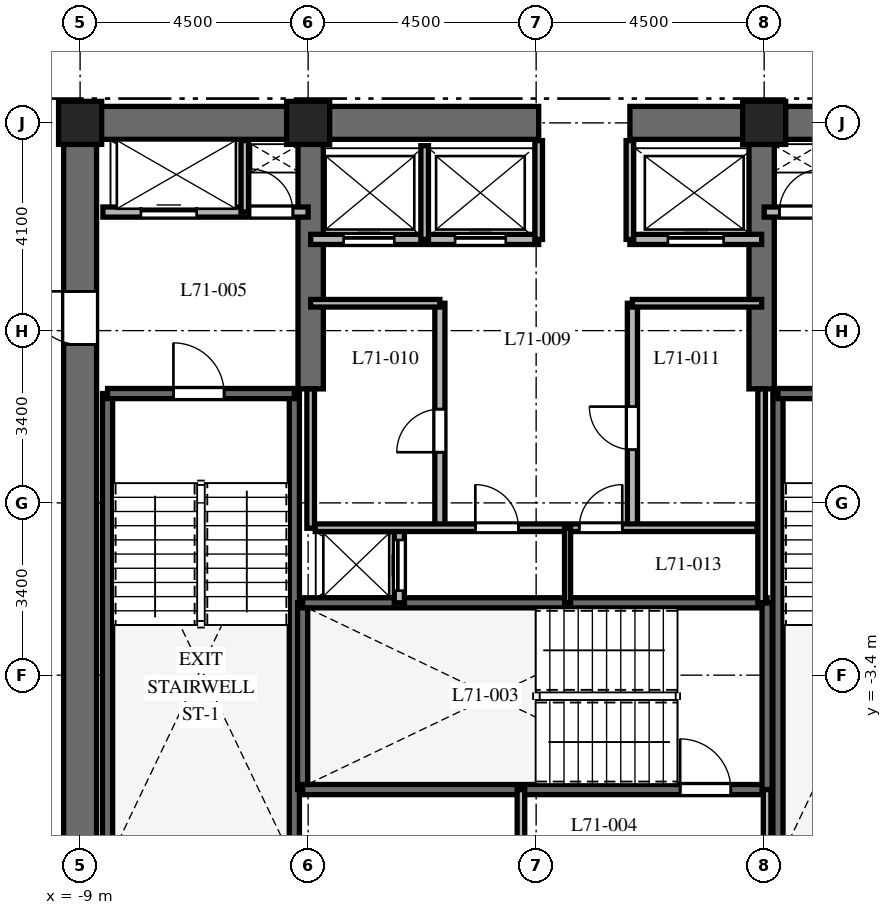
"""IFC4 building model, lengths in metres.
Left out: names, types, materials, properties, quantities, classifications, styles, units other than length and angle.
Written with IfcOpenShell. Run it as: python <this file> out.ifc"""

import sys

from ifc_helpers import new_model, si_unit, direction, frame, frame_2d, origin, origin_2d, place, context, subcontext, project, spatial, rectangle, extrude, element, fill, save


model = new_model("IFC4")
c1 = context("Model", 3, precision=1e-05, world=origin(), true_north=direction((0.0, 1.0)))
c2 = subcontext(c1, "Body", "Model", "MODEL_VIEW")
j1 = project(units=[si_unit("LENGTHUNIT", "METRE"), si_unit("PLANEANGLEUNIT", "RADIAN")], contexts=[c1])
p1 = place(None, origin())
s1 = spatial("IfcSite", under=j1, at=p1, CompositionType="ELEMENT")
p2 = place(p1, origin())
s2 = spatial("IfcBuilding", under=s1, at=p2, CompositionType="ELEMENT")
p3 = place(p2, frame((0.0, 0.0, 284.7)))
s3 = spatial("IfcBuildingStorey", under=s2, at=p3, CompositionType="ELEMENT", Elevation=284.7)
p4 = place(p3, frame((-9.325, 7.5, 0.0), z_axis=(0.0, 0.0, 1.0), x_axis=(1.0, 0.0, 0.0)))
e1 = element("IfcWall", 1, at=p4, inside=s3, PredefinedType="SHEAR", context=c2, shape_type="SweptSolid", body=[
    extrude(rectangle(XDim=9.375, YDim=0.65, at=frame_2d((4.688, 0.0))), origin(), (0.0, 0.0, 1.0), 3.9),
])
p5 = place(p3, frame((1.85, 7.5, 0.0), z_axis=(0.0, 0.0, 1.0), x_axis=(1.0, 0.0, 0.0)))
e2 = element("IfcWall", 2, at=p5, inside=s3, PredefinedType="SHEAR", context=c2, shape_type="SweptSolid", body=[
    extrude(rectangle(XDim=7.475, YDim=0.65, at=frame_2d((3.737, 0.0))), origin(), (0.0, 0.0, 1.0), 3.9),
])
p6 = place(p3, frame((-9.0, -7.175, 0.0), z_axis=(0.0, 0.0, 1.0), x_axis=(0.0, 1.0, 0.0)))
e3 = element("IfcWall", 3, at=p6, inside=s3, PredefinedType="SHEAR", context=c2, shape_type="SweptSolid", body=[
    extrude(rectangle(XDim=14.35, YDim=0.65, at=frame_2d((7.175, 0.0))), origin(), (0.0, 0.0, 1.0), 3.9),
])
p7 = place(p6, frame((10.3, 0.0, 0.0)))
e4 = element("IfcOpeningElement", 4, at=p7, cuts=e3, PredefinedType="OPENING", context=c2, shape_type="SweptSolid", body=[
    extrude(rectangle(XDim=1.05, YDim=2.15, at=frame_2d((0.525, 1.075))), frame((0.0, 0.335, 0.0), z_axis=(0.0, -1.0, 0.0), x_axis=(1.0, 0.0, 0.0)), (0.0, 0.0, 1.0), 0.67),
])
for number, where, z_axis, x_axis in (
    (5, (-4.45, 2.25, 0.0), (0.0, 0.0, 1.0), (0.0, 1.0, 0.0)),
    (6, (4.45, 2.25, 0.0), (0.0, 0.0, 1.0), (0.0, 1.0, 0.0)),
):
    element("IfcWall", number, at=place(p3, frame(where, z_axis=z_axis, x_axis=x_axis)), inside=s3, PredefinedType="SHEAR", context=c2, shape_type="SweptSolid", body=[
        extrude(rectangle(XDim=4.925, YDim=0.5, at=frame_2d((2.462, 0.0))), origin(), (0.0, 0.0, 1.0), 3.9),
    ])
for number, where, z_axis, x_axis in (
    (7, (-8.458, -6.985, 0.0), (0.0, 0.0, 1.0), (0.0, 1.0, 0.0)),
    (8, (-4.772, -6.985, 0.0), (0.0, 0.0, 1.0), (0.0, 1.0, 0.0)),
):
    element("IfcWall", number, at=place(p3, frame(where, z_axis=z_axis, x_axis=x_axis)), inside=s3, PredefinedType="SHEAR", context=c2, shape_type="SweptSolid", body=[
        extrude(rectangle(XDim=9.143, YDim=0.2, at=frame_2d((4.572, 0.0))), origin(), (0.0, 0.0, 1.0), 3.9),
    ])
p8 = place(p3, frame((-8.458, 2.158, 0.0), z_axis=(0.0, 0.0, 1.0), x_axis=(1.0, 0.0, 0.0)))
e9 = element("IfcWall", 9, at=p8, inside=s3, PredefinedType="SHEAR", context=c2, shape_type="SweptSolid", body=[
    extrude(rectangle(XDim=3.686, YDim=0.2, at=frame_2d((1.843, 0.0))), origin(), (0.0, 0.0, 1.0), 3.9),
])
p9 = place(p8, frame((1.3, 0.0, 0.0)))
e10 = element("IfcOpeningElement", 10, at=p9, cuts=e9, PredefinedType="OPENING", context=c2, shape_type="SweptSolid", body=[
    extrude(rectangle(XDim=1.0, YDim=2.15, at=frame_2d((0.5, 1.075))), frame((0.0, 0.11, 0.0), z_axis=(0.0, -1.0, 0.0), x_axis=(1.0, 0.0, 0.0)), (0.0, 0.0, 1.0), 0.22),
])
p10 = place(p3, frame((4.772, -6.985, 0.0), z_axis=(0.0, 0.0, 1.0), x_axis=(0.0, 1.0, 0.0)))
e11 = element("IfcWall", 11, at=p10, inside=s3, PredefinedType="SHEAR", context=c2, shape_type="SweptSolid", body=[
    extrude(rectangle(XDim=9.143, YDim=0.2, at=frame_2d((4.572, 0.0))), origin(), (0.0, 0.0, 1.0), 3.9),
])
p11 = place(p3, frame((4.772, 2.158, 0.0), z_axis=(0.0, 0.0, 1.0), x_axis=(1.0, 0.0, 0.0)))
e12 = element("IfcWall", 12, at=p11, inside=s3, PredefinedType="SHEAR", context=c2, shape_type="SweptSolid", body=[
    extrude(rectangle(XDim=3.686, YDim=0.2, at=frame_2d((1.843, 0.0))), origin(), (0.0, 0.0, 1.0), 3.9),
])
p12 = place(p11, frame((1.35, 0.0, 0.0)))
e13 = element("IfcOpeningElement", 13, at=p12, cuts=e12, PredefinedType="OPENING", context=c2, shape_type="SweptSolid", body=[
    extrude(rectangle(XDim=1.0, YDim=2.15, at=frame_2d((0.5, 1.075))), frame((0.0, 0.11, 0.0), z_axis=(0.0, -1.0, 0.0), x_axis=(1.0, 0.0, 0.0)), (0.0, 0.0, 1.0), 0.22),
])
p13 = place(p3, frame((-4.608, -5.658, 0.0), z_axis=(0.0, 0.0, 1.0), x_axis=(0.0, 1.0, 0.0)))
e14 = element("IfcWall", 14, at=p13, inside=s3, PredefinedType="SHEAR", context=c2, shape_type="SweptSolid", body=[
    extrude(rectangle(XDim=3.686, YDim=0.2, at=frame_2d((1.843, 0.0))), origin(), (0.0, 0.0, 1.0), 3.9),
])
p14 = place(p3, frame((-4.608, -5.658, 0.0), z_axis=(0.0, 0.0, 1.0), x_axis=(1.0, 0.0, 0.0)))
e15 = element("IfcWall", 15, at=p14, inside=s3, PredefinedType="SHEAR", context=c2, shape_type="SweptSolid", body=[
    extrude(rectangle(XDim=9.166, YDim=0.2, at=frame_2d((4.583, 0.0))), origin(), (0.0, 0.0, 1.0), 3.9),
])
p15 = place(p14, frame((7.45, 0.0, 0.0)))
e16 = element("IfcOpeningElement", 16, at=p15, cuts=e15, PredefinedType="OPENING", context=c2, shape_type="SweptSolid", body=[
    extrude(rectangle(XDim=1.0, YDim=2.15, at=frame_2d((0.5, 1.075))), frame((0.0, 0.11, 0.0), z_axis=(0.0, -1.0, 0.0), x_axis=(1.0, 0.0, 0.0)), (0.0, 0.0, 1.0), 0.22),
])
p16 = place(p3, frame((-4.608, -1.972, 0.0), z_axis=(0.0, 0.0, 1.0), x_axis=(1.0, 0.0, 0.0)))
e17 = element("IfcWall", 17, at=p16, inside=s3, PredefinedType="SHEAR", context=c2, shape_type="SweptSolid", body=[
    extrude(rectangle(XDim=9.166, YDim=0.2, at=frame_2d((4.583, 0.0))), origin(), (0.0, 0.0, 1.0), 3.9),
])
p17 = place(p3, frame((4.558, -5.658, 0.0), z_axis=(0.0, 0.0, 1.0), x_axis=(0.0, 1.0, 0.0)))
e18 = element("IfcWall", 18, at=p17, inside=s3, PredefinedType="SHEAR", context=c2, shape_type="SweptSolid", body=[
    extrude(rectangle(XDim=3.686, YDim=0.2, at=frame_2d((1.843, 0.0))), origin(), (0.0, 0.0, 1.0), 3.9),
])
for number, where, z_axis, x_axis in (
    (19, (4.5, 7.5, 0.0), (0.0, 0.0, 1.0), (1.0, 0.0, 0.0)),
    (20, (-4.5, 7.5, 0.0), (0.0, 0.0, 1.0), (1.0, 0.0, 0.0)),
    (21, (-9.0, 7.5, 0.0), (0.0, 0.0, 1.0), (1.0, 0.0, 0.0)),
):
    element("IfcColumn", number, at=place(p3, frame(where, z_axis=z_axis, x_axis=x_axis)), inside=s3, PredefinedType="COLUMN", context=c2, shape_type="SweptSolid", body=[
        extrude(rectangle(XDim=0.85, YDim=0.85, at=origin_2d()), origin(), (0.0, 0.0, 1.0), 3.9),
    ])
for number, where, z_axis, x_axis in (
    (22, (-0.3, -7.02, 0.0), (0.0, 0.0, 1.0), (0.0, 1.0, 0.0)),
    (23, (4.558, -7.02, 0.0), (0.0, 0.0, 1.0), (0.0, 1.0, 0.0)),
):
    element("IfcWall", number, at=place(p3, frame(where, z_axis=z_axis, x_axis=x_axis)), inside=s3, PredefinedType="PARTITIONING", context=c2, shape_type="SweptSolid", body=[
        extrude(rectangle(XDim=1.362, YDim=0.15, at=frame_2d((0.681, 0.0))), origin(), (0.0, 0.0, 1.0), 3.58),
    ])
p18 = place(p3, frame((-8.55, 5.74, 0.0), z_axis=(0.0, 0.0, 1.0), x_axis=(1.0, 0.0, 0.0)))
e24 = element("IfcWall", 24, at=p18, inside=s3, PredefinedType="PARTITIONING", context=c2, shape_type="SweptSolid", body=[
    extrude(rectangle(XDim=4.05, YDim=0.2, at=frame_2d((2.025, 0.0))), origin(), (0.0, 0.0, 1.0), 3.58),
])
p19 = place(p18, frame((0.75, 0.0, 0.0)))
e25 = element("IfcOpeningElement", 25, at=p19, cuts=e24, PredefinedType="OPENING", context=c2, shape_type="SweptSolid", body=[
    extrude(rectangle(XDim=1.1, YDim=2.2, at=frame_2d((0.55, 1.1))), frame((0.0, 0.11, 0.0), z_axis=(0.0, -1.0, 0.0), x_axis=(1.0, 0.0, 0.0)), (0.0, 0.0, 1.0), 0.22),
])
p20 = place(p18, frame((2.9, 0.0, 0.0)))
e26 = element("IfcOpeningElement", 26, at=p20, cuts=e24, PredefinedType="OPENING", context=c2, shape_type="SweptSolid", body=[
    extrude(rectangle(XDim=0.85, YDim=2.03, at=frame_2d((0.425, 1.015))), frame((0.0, 0.11, 0.0), z_axis=(0.0, -1.0, 0.0), x_axis=(1.0, 0.0, 0.0)), (0.0, 0.0, 1.0), 0.22),
])
p21 = place(p3, frame((-5.75, 5.74, 0.0), z_axis=(0.0, 0.0, 1.0), x_axis=(0.0, 1.0, 0.0)))
e27 = element("IfcWall", 27, at=p21, inside=s3, PredefinedType="PARTITIONING", context=c2, shape_type="SweptSolid", body=[
    extrude(rectangle(XDim=1.41, YDim=0.15, at=frame_2d((0.705, 0.0))), origin(), (0.0, 0.0, 1.0), 3.58),
])
p22 = place(p3, frame((4.5, 5.74, 0.0), z_axis=(0.0, 0.0, 1.0), x_axis=(1.0, 0.0, 0.0)))
e28 = element("IfcWall", 28, at=p22, inside=s3, PredefinedType="PARTITIONING", context=c2, shape_type="SweptSolid", body=[
    extrude(rectangle(XDim=4.05, YDim=0.2, at=frame_2d((2.025, 0.0))), origin(), (0.0, 0.0, 1.0), 3.58),
])
p23 = place(p22, frame((0.3, 0.0, 0.0)))
e29 = element("IfcOpeningElement", 29, at=p23, cuts=e28, PredefinedType="OPENING", context=c2, shape_type="SweptSolid", body=[
    extrude(rectangle(XDim=0.85, YDim=2.03, at=frame_2d((0.425, 1.015))), frame((0.0, 0.11, 0.0), z_axis=(0.0, -1.0, 0.0), x_axis=(1.0, 0.0, 0.0)), (0.0, 0.0, 1.0), 0.22),
])
p24 = place(p22, frame((2.15, 0.0, 0.0)))
e30 = element("IfcOpeningElement", 30, at=p24, cuts=e28, PredefinedType="OPENING", context=c2, shape_type="SweptSolid", body=[
    extrude(rectangle(XDim=1.1, YDim=2.2, at=frame_2d((0.55, 1.1))), frame((0.0, 0.11, 0.0), z_axis=(0.0, -1.0, 0.0), x_axis=(1.0, 0.0, 0.0)), (0.0, 0.0, 1.0), 0.22),
])
p25 = place(p3, frame((-2.7, -1.972, 0.0), z_axis=(0.0, 0.0, 1.0), x_axis=(0.0, 1.0, 0.0)))
e31 = element("IfcWall", 31, at=p25, inside=s3, PredefinedType="PARTITIONING", context=c2, shape_type="SweptSolid", body=[
    extrude(rectangle(XDim=1.472, YDim=0.2, at=frame_2d((0.736, 0.0))), origin(), (0.0, 0.0, 1.0), 3.58),
])
p26 = place(p25, frame((0.24, 0.0, 0.0)))
e32 = element("IfcOpeningElement", 32, at=p26, cuts=e31, PredefinedType="OPENING", context=c2, shape_type="SweptSolid", body=[
    extrude(rectangle(XDim=1.0, YDim=2.2, at=frame_2d((0.5, 1.1))), frame((0.0, 0.11, 0.0), z_axis=(0.0, -1.0, 0.0), x_axis=(1.0, 0.0, 0.0)), (0.0, 0.0, 1.0), 0.22),
])
p27 = place(p3, frame((-4.45, 5.2, 0.0), z_axis=(0.0, 0.0, 1.0), x_axis=(1.0, 0.0, 0.0)))
e33 = element("IfcWall", 33, at=p27, inside=s3, PredefinedType="PARTITIONING", context=c2, shape_type="SweptSolid", body=[
    extrude(rectangle(XDim=4.5, YDim=0.2, at=frame_2d((2.25, 0.0))), origin(), (0.0, 0.0, 1.0), 3.58),
])
p28 = place(p27, frame((0.65, 0.0, 0.0)))
e34 = element("IfcOpeningElement", 34, at=p28, cuts=e33, PredefinedType="OPENING", context=c2, shape_type="SweptSolid", body=[
    extrude(rectangle(XDim=1.0, YDim=2.2, at=frame_2d((0.5, 1.1))), frame((0.0, 0.11, 0.0), z_axis=(0.0, -1.0, 0.0), x_axis=(1.0, 0.0, 0.0)), (0.0, 0.0, 1.0), 0.22),
])
p29 = place(p27, frame((2.85, 0.0, 0.0)))
e35 = element("IfcOpeningElement", 35, at=p29, cuts=e33, PredefinedType="OPENING", context=c2, shape_type="SweptSolid", body=[
    extrude(rectangle(XDim=1.0, YDim=2.2, at=frame_2d((0.5, 1.1))), frame((0.0, 0.11, 0.0), z_axis=(0.0, -1.0, 0.0), x_axis=(1.0, 0.0, 0.0)), (0.0, 0.0, 1.0), 0.22),
])
p30 = place(p3, frame((1.85, 5.2, 0.0), z_axis=(0.0, 0.0, 1.0), x_axis=(1.0, 0.0, 0.0)))
e36 = element("IfcWall", 36, at=p30, inside=s3, PredefinedType="PARTITIONING", context=c2, shape_type="SweptSolid", body=[
    extrude(rectangle(XDim=2.6, YDim=0.2, at=frame_2d((1.3, 0.0))), origin(), (0.0, 0.0, 1.0), 3.58),
])
p31 = place(p30, frame((0.75, 0.0, 0.0)))
e37 = element("IfcOpeningElement", 37, at=p31, cuts=e36, PredefinedType="OPENING", context=c2, shape_type="SweptSolid", body=[
    extrude(rectangle(XDim=1.1, YDim=2.2, at=frame_2d((0.55, 1.1))), frame((0.0, 0.11, 0.0), z_axis=(0.0, -1.0, 0.0), x_axis=(1.0, 0.0, 0.0)), (0.0, 0.0, 1.0), 0.22),
])
p32 = place(p3, frame((-2.2, 5.2, 0.0), z_axis=(0.0, 0.0, 1.0), x_axis=(0.0, 1.0, 0.0)))
e38 = element("IfcWall", 38, at=p32, inside=s3, PredefinedType="PARTITIONING", context=c2, shape_type="SweptSolid", body=[
    extrude(rectangle(XDim=1.85, YDim=0.15, at=frame_2d((0.925, 0.0))), origin(), (0.0, 0.0, 1.0), 3.58),
])
for number, where, z_axis, x_axis in (
    (39, (0.05, 5.2, 0.0), (0.0, 0.0, 1.0), (0.0, 1.0, 0.0)),
    (40, (1.85, 5.2, 0.0), (0.0, 0.0, 1.0), (0.0, 1.0, 0.0)),
):
    element("IfcWall", number, at=place(p3, frame(where, z_axis=z_axis, x_axis=x_axis)), inside=s3, PredefinedType="PARTITIONING", context=c2, shape_type="SweptSolid", body=[
        extrude(rectangle(XDim=1.95, YDim=0.15, at=frame_2d((0.975, 0.0))), origin(), (0.0, 0.0, 1.0), 3.58),
    ])
p33 = place(p3, frame((-4.45, -0.5, 0.0), z_axis=(0.0, 0.0, 1.0), x_axis=(0.0, 1.0, 0.0)))
e41 = element("IfcWall", 41, at=p33, inside=s3, PredefinedType="PARTITIONING", context=c2, shape_type="SweptSolid", body=[
    extrude(rectangle(XDim=2.75, YDim=0.15, at=frame_2d((1.375, 0.0))), origin(), (0.0, 0.0, 1.0), 3.58),
])
p34 = place(p3, frame((4.45, -1.972, 0.0), z_axis=(0.0, 0.0, 1.0), x_axis=(0.0, 1.0, 0.0)))
e42 = element("IfcWall", 42, at=p34, inside=s3, PredefinedType="PARTITIONING", context=c2, shape_type="SweptSolid", body=[
    extrude(rectangle(XDim=4.222, YDim=0.15, at=frame_2d((2.111, 0.0))), origin(), (0.0, 0.0, 1.0), 3.58),
])
p35 = place(p3, frame((-1.9, -0.5, 0.0), z_axis=(0.0, 0.0, 1.0), x_axis=(0.0, 1.0, 0.0)))
e43 = element("IfcWall", 43, at=p35, inside=s3, PredefinedType="PARTITIONING", context=c2, shape_type="SweptSolid", body=[
    extrude(rectangle(XDim=4.44, YDim=0.2, at=frame_2d((2.22, 0.0))), origin(), (0.0, 0.0, 1.0), 3.58),
])
p36 = place(p35, frame((1.5, 0.0, 0.0)))
e44 = element("IfcOpeningElement", 44, at=p36, cuts=e43, PredefinedType="OPENING", context=c2, shape_type="SweptSolid", body=[
    extrude(rectangle(XDim=0.85, YDim=2.03, at=frame_2d((0.425, 1.015))), frame((0.0, 0.11, 0.0), z_axis=(0.0, -1.0, 0.0), x_axis=(1.0, 0.0, 0.0)), (0.0, 0.0, 1.0), 0.22),
])
p37 = place(p3, frame((-4.45, 3.94, 0.0), z_axis=(0.0, 0.0, 1.0), x_axis=(1.0, 0.0, 0.0)))
e45 = element("IfcWall", 45, at=p37, inside=s3, PredefinedType="PARTITIONING", context=c2, shape_type="SweptSolid", body=[
    extrude(rectangle(XDim=2.55, YDim=0.15, at=frame_2d((1.275, 0.0))), origin(), (0.0, 0.0, 1.0), 3.58),
])
p38 = place(p3, frame((1.9, -0.5, 0.0), z_axis=(0.0, 0.0, 1.0), x_axis=(0.0, 1.0, 0.0)))
e46 = element("IfcWall", 46, at=p38, inside=s3, PredefinedType="PARTITIONING", context=c2, shape_type="SweptSolid", body=[
    extrude(rectangle(XDim=4.44, YDim=0.2, at=frame_2d((2.22, 0.0))), origin(), (0.0, 0.0, 1.0), 3.58),
])
p39 = place(p38, frame((1.55, 0.0, 0.0)))
e47 = element("IfcOpeningElement", 47, at=p39, cuts=e46, PredefinedType="OPENING", context=c2, shape_type="SweptSolid", body=[
    extrude(rectangle(XDim=0.85, YDim=2.03, at=frame_2d((0.425, 1.015))), frame((0.0, 0.11, 0.0), z_axis=(0.0, -1.0, 0.0), x_axis=(1.0, 0.0, 0.0)), (0.0, 0.0, 1.0), 0.22),
])
p40 = place(p3, frame((1.9, 3.94, 0.0), z_axis=(0.0, 0.0, 1.0), x_axis=(1.0, 0.0, 0.0)))
e48 = element("IfcWall", 48, at=p40, inside=s3, PredefinedType="PARTITIONING", context=c2, shape_type="SweptSolid", body=[
    extrude(rectangle(XDim=2.55, YDim=0.15, at=frame_2d((1.275, 0.0))), origin(), (0.0, 0.0, 1.0), 3.58),
])
p41 = place(p3, frame((-4.36, -0.49, 0.0), z_axis=(0.0, 0.0, 1.0), x_axis=(1.0, 0.0, 0.0)))
e49 = element("IfcWall", 49, at=p41, inside=s3, PredefinedType="PARTITIONING", context=c2, shape_type="SweptSolid", body=[
    extrude(rectangle(XDim=8.72, YDim=0.15, at=frame_2d((4.36, 0.0))), origin(), (0.0, 0.0, 1.0), 3.58),
])
p42 = place(p41, frame((3.16, 0.0, 0.0)))
e50 = element("IfcOpeningElement", 50, at=p42, cuts=e49, PredefinedType="OPENING", context=c2, shape_type="SweptSolid", body=[
    extrude(rectangle(XDim=0.85, YDim=2.03, at=frame_2d((0.425, 1.015))), frame((0.0, 0.085, 0.0), z_axis=(0.0, -1.0, 0.0), x_axis=(1.0, 0.0, 0.0)), (0.0, 0.0, 1.0), 0.17),
])
p43 = place(p41, frame((5.21, 0.0, 0.0)))
e51 = element("IfcOpeningElement", 51, at=p43, cuts=e49, PredefinedType="OPENING", context=c2, shape_type="SweptSolid", body=[
    extrude(rectangle(XDim=0.85, YDim=2.03, at=frame_2d((0.425, 1.015))), frame((0.0, 0.085, 0.0), z_axis=(0.0, -1.0, 0.0), x_axis=(1.0, 0.0, 0.0)), (0.0, 0.0, 1.0), 0.17),
])
p44 = place(p3, frame((0.62, -1.972, 0.0), z_axis=(0.0, 0.0, 1.0), x_axis=(0.0, 1.0, 0.0)))
e52 = element("IfcWall", 52, at=p44, inside=s3, PredefinedType="PARTITIONING", context=c2, shape_type="SweptSolid", body=[
    extrude(rectangle(XDim=1.472, YDim=0.12, at=frame_2d((0.736, 0.0))), origin(), (0.0, 0.0, 1.0), 3.58),
])
p45 = place(p9, origin())
e53 = element("IfcDoor", 53, at=p45, inside=s3, OperationType="SINGLE_SWING_LEFT", PredefinedType="DOOR", context=c2, shape_type="SweptSolid", body=[
    extrude(rectangle(XDim=1.0, YDim=2.15, at=frame_2d((0.5, 1.075))), frame((0.0, 0.025, 0.0), z_axis=(0.0, -1.0, 0.0), x_axis=(1.0, 0.0, 0.0)), (0.0, 0.0, 1.0), 0.05),
])
fill(e10, e53)
p46 = place(p15, origin())
e54 = element("IfcDoor", 54, at=p46, inside=s3, OperationType="SINGLE_SWING_LEFT", PredefinedType="DOOR", context=c2, shape_type="SweptSolid", body=[
    extrude(rectangle(XDim=1.0, YDim=2.15, at=frame_2d((0.5, 1.075))), frame((0.0, 0.025, 0.0), z_axis=(0.0, -1.0, 0.0), x_axis=(1.0, 0.0, 0.0)), (0.0, 0.0, 1.0), 0.05),
])
fill(e16, e54)
p47 = place(p7, origin())
e55 = element("IfcDoor", 55, at=p47, inside=s3, OperationType="SINGLE_SWING_RIGHT", PredefinedType="DOOR", context=c2, shape_type="SweptSolid", body=[
    extrude(rectangle(XDim=1.05, YDim=2.15, at=frame_2d((0.525, 1.075))), frame((0.0, 0.025, 0.0), z_axis=(0.0, -1.0, 0.0), x_axis=(1.0, 0.0, 0.0)), (0.0, 0.0, 1.0), 0.05),
])
fill(e4, e55)
p48 = place(p19, origin())
e56 = element("IfcDoor", 56, at=p48, inside=s3, OperationType="SLIDING_TO_LEFT", PredefinedType="DOOR", context=c2, shape_type="SweptSolid", body=[
    extrude(rectangle(XDim=1.1, YDim=2.2, at=frame_2d((0.55, 1.1))), frame((0.0, 0.025, 0.0), z_axis=(0.0, -1.0, 0.0), x_axis=(1.0, 0.0, 0.0)), (0.0, 0.0, 1.0), 0.05),
])
fill(e25, e56)
p49 = place(p20, origin())
e57 = element("IfcDoor", 57, at=p49, inside=s3, OperationType="SINGLE_SWING_LEFT", PredefinedType="DOOR", context=c2, shape_type="SweptSolid", body=[
    extrude(rectangle(XDim=0.85, YDim=2.03, at=frame_2d((0.425, 1.015))), frame((0.0, 0.025, 0.0), z_axis=(0.0, -1.0, 0.0), x_axis=(1.0, 0.0, 0.0)), (0.0, 0.0, 1.0), 0.05),
])
fill(e26, e57)
p50 = place(p23, origin())
e58 = element("IfcDoor", 58, at=p50, inside=s3, OperationType="SINGLE_SWING_RIGHT", PredefinedType="DOOR", context=c2, shape_type="SweptSolid", body=[
    extrude(rectangle(XDim=0.85, YDim=2.03, at=frame_2d((0.425, 1.015))), frame((0.0, 0.025, 0.0), z_axis=(0.0, -1.0, 0.0), x_axis=(1.0, 0.0, 0.0)), (0.0, 0.0, 1.0), 0.05),
])
fill(e29, e58)
p51 = place(p26, origin())
e59 = element("IfcDoor", 59, at=p51, inside=s3, OperationType="SLIDING_TO_LEFT", PredefinedType="DOOR", context=c2, shape_type="SweptSolid", body=[
    extrude(rectangle(XDim=1.0, YDim=2.2, at=frame_2d((0.5, 1.1))), frame((0.0, 0.025, 0.0), z_axis=(0.0, -1.0, 0.0), x_axis=(1.0, 0.0, 0.0)), (0.0, 0.0, 1.0), 0.05),
])
fill(e32, e59)
p52 = place(p28, origin())
e60 = element("IfcDoor", 60, at=p52, inside=s3, OperationType="SLIDING_TO_LEFT", PredefinedType="DOOR", context=c2, shape_type="SweptSolid", body=[
    extrude(rectangle(XDim=1.0, YDim=2.2, at=frame_2d((0.5, 1.1))), frame((0.0, 0.025, 0.0), z_axis=(0.0, -1.0, 0.0), x_axis=(1.0, 0.0, 0.0)), (0.0, 0.0, 1.0), 0.05),
])
fill(e34, e60)
p53 = place(p29, origin())
e61 = element("IfcDoor", 61, at=p53, inside=s3, OperationType="SLIDING_TO_RIGHT", PredefinedType="DOOR", context=c2, shape_type="SweptSolid", body=[
    extrude(rectangle(XDim=1.0, YDim=2.2, at=frame_2d((0.5, 1.1))), frame((0.0, 0.025, 0.0), z_axis=(0.0, -1.0, 0.0), x_axis=(1.0, 0.0, 0.0)), (0.0, 0.0, 1.0), 0.05),
])
fill(e35, e61)
p54 = place(p31, origin())
e62 = element("IfcDoor", 62, at=p54, inside=s3, OperationType="SLIDING_TO_RIGHT", PredefinedType="DOOR", context=c2, shape_type="SweptSolid", body=[
    extrude(rectangle(XDim=1.1, YDim=2.2, at=frame_2d((0.55, 1.1))), frame((0.0, 0.025, 0.0), z_axis=(0.0, -1.0, 0.0), x_axis=(1.0, 0.0, 0.0)), (0.0, 0.0, 1.0), 0.05),
])
fill(e37, e62)
p55 = place(p36, origin())
e63 = element("IfcDoor", 63, at=p55, inside=s3, OperationType="SINGLE_SWING_LEFT", PredefinedType="DOOR", context=c2, shape_type="SweptSolid", body=[
    extrude(rectangle(XDim=0.85, YDim=2.03, at=frame_2d((0.425, 1.015))), frame((0.0, 0.025, 0.0), z_axis=(0.0, -1.0, 0.0), x_axis=(1.0, 0.0, 0.0)), (0.0, 0.0, 1.0), 0.05),
])
fill(e44, e63)
p56 = place(p39, origin())
e64 = element("IfcDoor", 64, at=p56, inside=s3, OperationType="SINGLE_SWING_RIGHT", PredefinedType="DOOR", context=c2, shape_type="SweptSolid", body=[
    extrude(rectangle(XDim=0.85, YDim=2.03, at=frame_2d((0.425, 1.015))), frame((0.0, 0.025, 0.0), z_axis=(0.0, -1.0, 0.0), x_axis=(1.0, 0.0, 0.0)), (0.0, 0.0, 1.0), 0.05),
])
fill(e47, e64)
p57 = place(p42, origin())
e65 = element("IfcDoor", 65, at=p57, inside=s3, OperationType="SINGLE_SWING_LEFT", PredefinedType="DOOR", context=c2, shape_type="SweptSolid", body=[
    extrude(rectangle(XDim=0.85, YDim=2.03, at=frame_2d((0.425, 1.015))), frame((0.0, 0.025, 0.0), z_axis=(0.0, -1.0, 0.0), x_axis=(1.0, 0.0, 0.0)), (0.0, 0.0, 1.0), 0.05),
])
fill(e50, e65)
p58 = place(p43, origin())
e66 = element("IfcDoor", 66, at=p58, inside=s3, OperationType="SINGLE_SWING_RIGHT", PredefinedType="DOOR", context=c2, shape_type="SweptSolid", body=[
    extrude(rectangle(XDim=0.85, YDim=2.03, at=frame_2d((0.425, 1.015))), frame((0.0, 0.025, 0.0), z_axis=(0.0, -1.0, 0.0), x_axis=(1.0, 0.0, 0.0)), (0.0, 0.0, 1.0), 0.05),
])
fill(e51, e66)
save(model, sys.argv[1])
